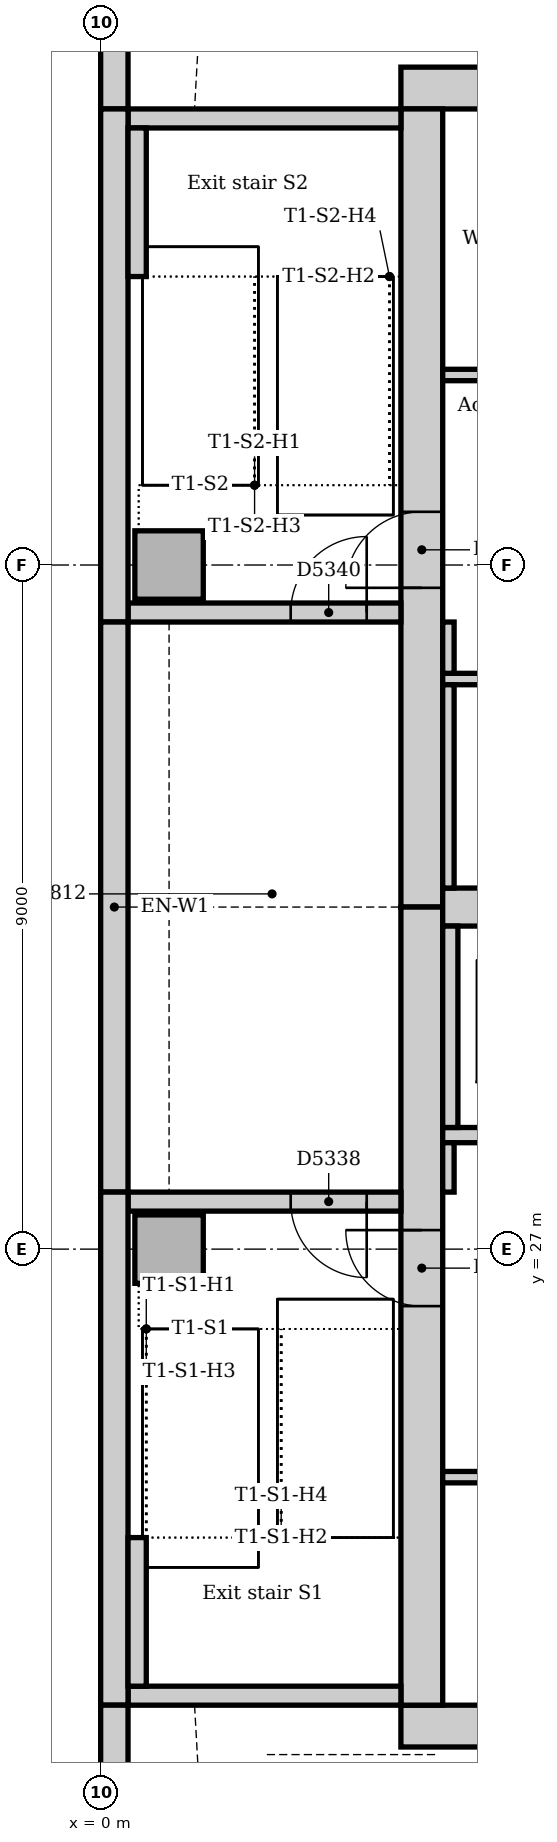
"""IFC4 building model, lengths in metres.
Left out: names, types, materials, properties, quantities, classifications, styles, units other than length and angle.
Written with IfcOpenShell. Run it as: python <this file> out.ifc"""

import sys

from ifc_helpers import new_model, si_unit, direction, frame, frame_2d, origin, origin_2d, place, context, subcontext, project, spatial, rectangle, extrude, element, fill, save


model = new_model("IFC4")
c1 = context("Model", 3, precision=1e-05, world=origin(), true_north=direction((0.0, 1.0)))
c2 = subcontext(c1, "Body", "Model", "MODEL_VIEW")
j1 = project(units=[si_unit("LENGTHUNIT", "METRE"), si_unit("PLANEANGLEUNIT", "RADIAN")], contexts=[c1])
p1 = place(None, origin())
s1 = spatial("IfcSite", under=j1, at=p1, CompositionType="ELEMENT")
p2 = place(p1, origin())
s2 = spatial("IfcBuilding", under=s1, at=p2, CompositionType="ELEMENT")
p3 = place(p2, frame((0.0, 0.0, 242.0)))
s3 = spatial("IfcBuildingStorey", under=s2, at=p3, CompositionType="ELEMENT", Elevation=242.0)
for number, where, z_axis, x_axis in (
    (1, (3.95, 20.725, 0.0), (0.0, 0.0, 1.0), (1.0, 0.0, 0.0)),
    (2, (23.05, 42.275, 0.0), (0.0, 0.0, 1.0), (-1.0, 0.0, 0.0)),
):
    element("IfcWall", number, at=place(p3, frame(where, z_axis=z_axis, x_axis=x_axis)), inside=s3, PredefinedType="SOLIDWALL", context=c2, shape_type="SweptSolid", body=[
        extrude(rectangle(XDim=19.1, YDim=0.55, at=frame_2d((9.55, 0.0))), origin(), (0.0, 0.0, 1.0), 5.0),
    ])
p4 = place(p3, frame((4.225, 42.0, 0.0), z_axis=(0.0, 0.0, 1.0), x_axis=(0.0, -1.0, 0.0)))
e3 = element("IfcWall", 3, at=p4, inside=s3, PredefinedType="SOLIDWALL", context=c2, shape_type="SweptSolid", body=[
    extrude(rectangle(XDim=10.5, YDim=0.55, at=frame_2d((5.25, 0.0))), origin(), (0.0, 0.0, 1.0), 5.0),
])
p5 = place(p4, frame((5.3, 0.0, 0.0)))
e4 = element("IfcOpeningElement", 4, at=p5, cuts=e3, PredefinedType="OPENING", context=c2, shape_type="SweptSolid", body=[
    extrude(rectangle(XDim=1.0, YDim=2.1, at=frame_2d((0.5, 1.05))), frame((0.0, 0.285, 0.0), z_axis=(0.0, -1.0, 0.0), x_axis=(1.0, 0.0, 0.0)), (0.0, 0.0, 1.0), 0.57),
])
p6 = place(p3, frame((4.225, 31.5, 0.0), z_axis=(0.0, 0.0, 1.0), x_axis=(0.0, -1.0, 0.0)))
e5 = element("IfcWall", 5, at=p6, inside=s3, PredefinedType="SOLIDWALL", context=c2, shape_type="SweptSolid", body=[
    extrude(rectangle(XDim=10.5, YDim=0.55, at=frame_2d((5.25, 0.0))), origin(), (0.0, 0.0, 1.0), 5.0),
])
p7 = place(p6, frame((4.25, 0.0, 0.0)))
e6 = element("IfcOpeningElement", 6, at=p7, cuts=e5, PredefinedType="OPENING", context=c2, shape_type="SweptSolid", body=[
    extrude(rectangle(XDim=1.0, YDim=2.1, at=frame_2d((0.5, 1.05))), frame((0.0, 0.285, 0.0), z_axis=(0.0, -1.0, 0.0), x_axis=(1.0, 0.0, 0.0)), (0.0, 0.0, 1.0), 0.57),
])
p8 = place(p3, frame((4.5, 31.5, 0.0), z_axis=(0.0, 0.0, 1.0), x_axis=(1.0, 0.0, 0.0)))
e7 = element("IfcWall", 7, at=p8, inside=s3, PredefinedType="SOLIDWALL", context=c2, shape_type="SweptSolid", body=[
    extrude(rectangle(XDim=18.0, YDim=0.5, at=frame_2d((9.0, 0.0))), origin(), (0.0, 0.0, 1.0), 5.0),
])
p9 = place(p3, frame((0.36, 21.125, 0.0), z_axis=(0.0, 0.0, 1.0), x_axis=(1.0, 0.0, 0.0)))
e8 = element("IfcWall", 8, at=p9, inside=s3, PredefinedType="SOLIDWALL", context=c2, shape_type="SweptSolid", body=[
    extrude(rectangle(XDim=3.59, YDim=0.25, at=frame_2d((1.795, 0.0))), origin(), (0.0, 0.0, 1.0), 5.0),
])
p10 = place(p3, frame((3.95, 27.625, 0.0), z_axis=(0.0, 0.0, 1.0), x_axis=(-1.0, 0.0, 0.0)))
e9 = element("IfcWall", 9, at=p10, inside=s3, PredefinedType="SOLIDWALL", context=c2, shape_type="SweptSolid", body=[
    extrude(rectangle(XDim=3.59, YDim=0.25, at=frame_2d((1.795, 0.0))), origin(), (0.0, 0.0, 1.0), 5.0),
])
p11 = place(p10, frame((0.45, 0.0, 0.0)))
e10 = element("IfcOpeningElement", 10, at=p11, cuts=e9, PredefinedType="OPENING", context=c2, shape_type="SweptSolid", body=[
    extrude(rectangle(XDim=1.0, YDim=2.1, at=frame_2d((0.5, 1.05))), frame((0.0, 0.135, 0.0), z_axis=(0.0, -1.0, 0.0), x_axis=(1.0, 0.0, 0.0)), (0.0, 0.0, 1.0), 0.27),
])
p12 = place(p3, frame((0.36, 35.375, 0.0), z_axis=(0.0, 0.0, 1.0), x_axis=(1.0, 0.0, 0.0)))
e11 = element("IfcWall", 11, at=p12, inside=s3, PredefinedType="SOLIDWALL", context=c2, shape_type="SweptSolid", body=[
    extrude(rectangle(XDim=3.59, YDim=0.25, at=frame_2d((1.795, 0.0))), origin(), (0.0, 0.0, 1.0), 5.0),
])
p13 = place(p12, frame((2.14, 0.0, 0.0)))
e12 = element("IfcOpeningElement", 12, at=p13, cuts=e11, PredefinedType="OPENING", context=c2, shape_type="SweptSolid", body=[
    extrude(rectangle(XDim=1.0, YDim=2.1, at=frame_2d((0.5, 1.05))), frame((0.0, 0.135, 0.0), z_axis=(0.0, -1.0, 0.0), x_axis=(1.0, 0.0, 0.0)), (0.0, 0.0, 1.0), 0.27),
])
p14 = place(p3, frame((3.95, 41.875, 0.0), z_axis=(0.0, 0.0, 1.0), x_axis=(-1.0, 0.0, 0.0)))
e13 = element("IfcWall", 13, at=p14, inside=s3, PredefinedType="SOLIDWALL", context=c2, shape_type="SweptSolid", body=[
    extrude(rectangle(XDim=3.59, YDim=0.25, at=frame_2d((1.795, 0.0))), origin(), (0.0, 0.0, 1.0), 5.0),
])
for number, where, z_axis, x_axis in (
    (14, (0.9, 27.0, 0.0), (0.0, 0.0, 1.0), (1.0, 0.0, 0.0)),
    (15, (0.9, 36.0, 0.0), (0.0, 0.0, 1.0), (1.0, 0.0, 0.0)),
):
    element("IfcColumn", number, at=place(p3, frame(where, z_axis=z_axis, x_axis=x_axis)), inside=s3, PredefinedType="COLUMN", context=c2, shape_type="SweptSolid", body=[
        extrude(rectangle(XDim=0.9, YDim=0.9, at=origin_2d()), origin(), (0.0, 0.0, 1.0), 5.0),
    ])
p15 = place(p3, frame((0.18, 54.257, 0.0), z_axis=(0.0, 0.0, 1.0), x_axis=(0.0, -1.0, 0.0)))
e16 = element("IfcWall", 16, at=p15, inside=s3, PredefinedType="STANDARD", context=c2, shape_type="SweptSolid", body=[
    extrude(rectangle(XDim=12.257, YDim=0.36, at=frame_2d((6.129, 0.0))), origin(), (0.0, 0.0, 1.0), 4.85),
])
p16 = place(p3, frame((0.18, 42.0, 0.0), z_axis=(0.0, 0.0, 1.0), x_axis=(0.0, -1.0, 0.0)))
e17 = element("IfcWall", 17, at=p16, inside=s3, PredefinedType="STANDARD", context=c2, shape_type="SweptSolid", body=[
    extrude(rectangle(XDim=6.75, YDim=0.36, at=frame_2d((3.375, 0.0))), origin(), (0.0, 0.0, 1.0), 4.85),
])
p17 = place(p3, frame((0.18, 35.25, 0.0), z_axis=(0.0, 0.0, 1.0), x_axis=(0.0, -1.0, 0.0)))
e18 = element("IfcWall", 18, at=p17, inside=s3, PredefinedType="STANDARD", context=c2, shape_type="SweptSolid", body=[
    extrude(rectangle(XDim=7.5, YDim=0.36, at=frame_2d((3.75, 0.0))), origin(), (0.0, 0.0, 1.0), 4.85),
])
p18 = place(p3, frame((0.18, 27.75, 0.0), z_axis=(0.0, 0.0, 1.0), x_axis=(0.0, -1.0, 0.0)))
e19 = element("IfcWall", 19, at=p18, inside=s3, PredefinedType="STANDARD", context=c2, shape_type="SweptSolid", body=[
    extrude(rectangle(XDim=6.75, YDim=0.36, at=frame_2d((3.375, 0.0))), origin(), (0.0, 0.0, 1.0), 4.85),
])
p19 = place(p3, frame((0.18, 21.0, 0.0), z_axis=(0.0, 0.0, 1.0), x_axis=(0.0, -1.0, 0.0)))
e20 = element("IfcWall", 20, at=p19, inside=s3, PredefinedType="STANDARD", context=c2, shape_type="SweptSolid", body=[
    extrude(rectangle(XDim=3.257, YDim=0.36, at=frame_2d((1.629, 0.0))), origin(), (0.0, 0.0, 1.0), 4.85),
])
for number, where, z_axis, x_axis in (
    (21, (0.48, 21.25, 0.0), (0.0, 0.0, 1.0), (0.0, 1.0, 0.0)),
    (22, (0.48, 39.795, 0.0), (0.0, 0.0, 1.0), (0.0, 1.0, 0.0)),
):
    element("IfcWall", number, at=place(p3, frame(where, z_axis=z_axis, x_axis=x_axis)), inside=s3, PredefinedType="STANDARD", context=c2, shape_type="SweptSolid", body=[
        extrude(rectangle(XDim=1.955, YDim=0.24, at=frame_2d((0.978, 0.0))), origin(), (0.0, 0.0, 1.0), 5.0),
    ])
p20 = place(p3, frame((4.5, 28.5, 0.0), z_axis=(0.0, 0.0, 1.0), x_axis=(1.0, 0.0, 0.0)))
e23 = element("IfcWall", 23, at=p20, inside=s3, PredefinedType="PARTITIONING", context=c2, shape_type="SweptSolid", body=[
    extrude(rectangle(XDim=18.0, YDim=0.2, at=frame_2d((9.0, 0.0))), origin(), (0.0, 0.0, 1.0), 4.85),
])
p21 = place(p20, frame((0.95, 0.0, 0.0)))
e24 = element("IfcOpeningElement", 24, at=p21, cuts=e23, PredefinedType="OPENING", context=c2, shape_type="SweptSolid", body=[
    extrude(rectangle(XDim=1.1, YDim=2.1, at=frame_2d((0.55, 1.05))), frame((0.0, 0.11, 0.0), z_axis=(0.0, -1.0, 0.0), x_axis=(1.0, 0.0, 0.0)), (0.0, 0.0, 1.0), 0.22),
])
p22 = place(p20, frame((3.95, 0.0, 0.0)))
e25 = element("IfcOpeningElement", 25, at=p22, cuts=e23, PredefinedType="OPENING", context=c2, shape_type="SweptSolid", body=[
    extrude(rectangle(XDim=1.1, YDim=2.1, at=frame_2d((0.55, 1.05))), frame((0.0, 0.11, 0.0), z_axis=(0.0, -1.0, 0.0), x_axis=(1.0, 0.0, 0.0)), (0.0, 0.0, 1.0), 0.22),
])
p23 = place(p20, frame((6.95, 0.0, 0.0)))
e26 = element("IfcOpeningElement", 26, at=p23, cuts=e23, PredefinedType="OPENING", context=c2, shape_type="SweptSolid", body=[
    extrude(rectangle(XDim=1.1, YDim=2.1, at=frame_2d((0.55, 1.05))), frame((0.0, 0.11, 0.0), z_axis=(0.0, -1.0, 0.0), x_axis=(1.0, 0.0, 0.0)), (0.0, 0.0, 1.0), 0.22),
])
p24 = place(p20, frame((9.95, 0.0, 0.0)))
e27 = element("IfcOpeningElement", 27, at=p24, cuts=e23, PredefinedType="OPENING", context=c2, shape_type="SweptSolid", body=[
    extrude(rectangle(XDim=1.1, YDim=2.1, at=frame_2d((0.55, 1.05))), frame((0.0, 0.11, 0.0), z_axis=(0.0, -1.0, 0.0), x_axis=(1.0, 0.0, 0.0)), (0.0, 0.0, 1.0), 0.22),
])
p25 = place(p20, frame((12.95, 0.0, 0.0)))
e28 = element("IfcOpeningElement", 28, at=p25, cuts=e23, PredefinedType="OPENING", context=c2, shape_type="SweptSolid", body=[
    extrude(rectangle(XDim=1.1, YDim=2.1, at=frame_2d((0.55, 1.05))), frame((0.0, 0.11, 0.0), z_axis=(0.0, -1.0, 0.0), x_axis=(1.0, 0.0, 0.0)), (0.0, 0.0, 1.0), 0.22),
])
p26 = place(p20, frame((15.95, 0.0, 0.0)))
e29 = element("IfcOpeningElement", 29, at=p26, cuts=e23, PredefinedType="OPENING", context=c2, shape_type="SweptSolid", body=[
    extrude(rectangle(XDim=1.1, YDim=2.1, at=frame_2d((0.55, 1.05))), frame((0.0, 0.11, 0.0), z_axis=(0.0, -1.0, 0.0), x_axis=(1.0, 0.0, 0.0)), (0.0, 0.0, 1.0), 0.22),
])
p27 = place(p3, frame((4.6, 28.6, 0.0), z_axis=(0.0, 0.0, 1.0), x_axis=(0.0, 1.0, 0.0)))
e30 = element("IfcWall", 30, at=p27, inside=s3, PredefinedType="PARTITIONING", context=c2, shape_type="SweptSolid", body=[
    extrude(rectangle(XDim=2.65, YDim=0.2, at=frame_2d((1.325, 0.0))), origin(), (0.0, 0.0, 1.0), 4.85),
])
p28 = place(p3, frame((4.5, 24.0, 0.0), z_axis=(0.0, 0.0, 1.0), x_axis=(1.0, 0.0, 0.0)))
e31 = element("IfcWall", 31, at=p28, inside=s3, PredefinedType="PARTITIONING", context=c2, shape_type="SweptSolid", body=[
    extrude(rectangle(XDim=18.0, YDim=0.15, at=frame_2d((9.0, 0.0))), origin(), (0.0, 0.0, 1.0), 4.85),
])
p29 = place(p28, frame((3.35, 0.0, 0.0)))
e32 = element("IfcOpeningElement", 32, at=p29, cuts=e31, PredefinedType="OPENING", context=c2, shape_type="SweptSolid", body=[
    extrude(rectangle(XDim=0.9, YDim=2.1, at=frame_2d((0.45, 1.05))), frame((0.0, 0.085, 0.0), z_axis=(0.0, -1.0, 0.0), x_axis=(1.0, 0.0, 0.0)), (0.0, 0.0, 1.0), 0.17),
])
p30 = place(p28, frame((8.55, 0.0, 0.0)))
e33 = element("IfcOpeningElement", 33, at=p30, cuts=e31, PredefinedType="OPENING", context=c2, shape_type="SweptSolid", body=[
    extrude(rectangle(XDim=0.9, YDim=2.1, at=frame_2d((0.45, 1.05))), frame((0.0, 0.085, 0.0), z_axis=(0.0, -1.0, 0.0), x_axis=(1.0, 0.0, 0.0)), (0.0, 0.0, 1.0), 0.17),
])
p31 = place(p28, frame((13.7, 0.0, 0.0)))
e34 = element("IfcOpeningElement", 34, at=p31, cuts=e31, PredefinedType="OPENING", context=c2, shape_type="SweptSolid", body=[
    extrude(rectangle(XDim=0.9, YDim=2.1, at=frame_2d((0.45, 1.05))), frame((0.0, 0.085, 0.0), z_axis=(0.0, -1.0, 0.0), x_axis=(1.0, 0.0, 0.0)), (0.0, 0.0, 1.0), 0.17),
])
p32 = place(p3, frame((4.5, 38.5, 0.0), z_axis=(0.0, 0.0, 1.0), x_axis=(1.0, 0.0, 0.0)))
e35 = element("IfcWall", 35, at=p32, inside=s3, PredefinedType="PARTITIONING", context=c2, shape_type="SweptSolid", body=[
    extrude(rectangle(XDim=11.9, YDim=0.15, at=frame_2d((5.95, 0.0))), origin(), (0.0, 0.0, 1.0), 4.85),
])
p33 = place(p32, frame((1.1, 0.0, 0.0)))
e36 = element("IfcOpeningElement", 36, at=p33, cuts=e35, PredefinedType="OPENING", context=c2, shape_type="SweptSolid", body=[
    extrude(rectangle(XDim=0.9, YDim=2.1, at=frame_2d((0.45, 1.05))), frame((0.0, 0.085, 0.0), z_axis=(0.0, -1.0, 0.0), x_axis=(1.0, 0.0, 0.0)), (0.0, 0.0, 1.0), 0.17),
])
p34 = place(p32, frame((4.05, 0.0, 0.0)))
e37 = element("IfcOpeningElement", 37, at=p34, cuts=e35, PredefinedType="OPENING", context=c2, shape_type="SweptSolid", body=[
    extrude(rectangle(XDim=0.9, YDim=2.1, at=frame_2d((0.45, 1.05))), frame((0.0, 0.085, 0.0), z_axis=(0.0, -1.0, 0.0), x_axis=(1.0, 0.0, 0.0)), (0.0, 0.0, 1.0), 0.17),
])
p35 = place(p32, frame((7.05, 0.0, 0.0)))
e38 = element("IfcOpeningElement", 38, at=p35, cuts=e35, PredefinedType="OPENING", context=c2, shape_type="SweptSolid", body=[
    extrude(rectangle(XDim=0.9, YDim=2.1, at=frame_2d((0.45, 1.05))), frame((0.0, 0.085, 0.0), z_axis=(0.0, -1.0, 0.0), x_axis=(1.0, 0.0, 0.0)), (0.0, 0.0, 1.0), 0.17),
])
p36 = place(p32, frame((9.95, 0.0, 0.0)))
e39 = element("IfcOpeningElement", 39, at=p36, cuts=e35, PredefinedType="OPENING", context=c2, shape_type="SweptSolid", body=[
    extrude(rectangle(XDim=0.8, YDim=2.1, at=frame_2d((0.4, 1.05))), frame((0.0, 0.085, 0.0), z_axis=(0.0, -1.0, 0.0), x_axis=(1.0, 0.0, 0.0)), (0.0, 0.0, 1.0), 0.17),
])
p37 = place(p3, frame((4.5, 34.5, 0.0), z_axis=(0.0, 0.0, 1.0), x_axis=(1.0, 0.0, 0.0)))
e40 = element("IfcWall", 40, at=p37, inside=s3, PredefinedType="PARTITIONING", context=c2, shape_type="SweptSolid", body=[
    extrude(rectangle(XDim=5.9, YDim=0.15, at=frame_2d((2.95, 0.0))), origin(), (0.0, 0.0, 1.0), 4.85),
])
p38 = place(p37, frame((2.5, 0.0, 0.0)))
e41 = element("IfcOpeningElement", 41, at=p38, cuts=e40, PredefinedType="OPENING", context=c2, shape_type="SweptSolid", body=[
    extrude(rectangle(XDim=0.9, YDim=2.1, at=frame_2d((0.45, 1.05))), frame((0.0, 0.085, 0.0), z_axis=(0.0, -1.0, 0.0), x_axis=(1.0, 0.0, 0.0)), (0.0, 0.0, 1.0), 0.17),
])
p39 = place(p3, frame((4.575, 34.575, 0.0), z_axis=(0.0, 0.0, 1.0), x_axis=(0.0, 1.0, 0.0)))
e42 = element("IfcWall", 42, at=p39, inside=s3, PredefinedType="PARTITIONING", context=c2, shape_type="SweptSolid", body=[
    extrude(rectangle(XDim=0.675, YDim=0.15, at=frame_2d((0.338, 0.0))), origin(), (0.0, 0.0, 1.0), 4.85),
])
p40 = place(p3, frame((4.575, 31.75, 0.0), z_axis=(0.0, 0.0, 1.0), x_axis=(0.0, 1.0, 0.0)))
e43 = element("IfcWall", 43, at=p40, inside=s3, PredefinedType="PARTITIONING", context=c2, shape_type="SweptSolid", body=[
    extrude(rectangle(XDim=2.675, YDim=0.15, at=frame_2d((1.337, 0.0))), origin(), (0.0, 0.0, 1.0), 4.85),
])
p41 = place(p3, frame((4.575, 27.75, 0.0), z_axis=(0.0, 0.0, 1.0), x_axis=(0.0, 1.0, 0.0)))
e44 = element("IfcWall", 44, at=p41, inside=s3, PredefinedType="PARTITIONING", context=c2, shape_type="SweptSolid", body=[
    extrude(rectangle(XDim=0.65, YDim=0.15, at=frame_2d((0.325, 0.0))), origin(), (0.0, 0.0, 1.0), 4.85),
])
p42 = place(p7, frame((1.0, 0.0, 0.0), z_axis=(0.0, 0.0, 1.0), x_axis=(-1.0, 0.0, 0.0)))
e45 = element("IfcDoor", 45, at=p42, inside=s3, OperationType="SINGLE_SWING_RIGHT", PredefinedType="DOOR", context=c2, shape_type="SweptSolid", body=[
    extrude(rectangle(XDim=1.0, YDim=2.1, at=frame_2d((0.5, 1.05))), frame((0.0, 0.025, 0.0), z_axis=(0.0, -1.0, 0.0), x_axis=(1.0, 0.0, 0.0)), (0.0, 0.0, 1.0), 0.05),
])
fill(e6, e45)
p43 = place(p11, origin())
e46 = element("IfcDoor", 46, at=p43, inside=s3, OperationType="SINGLE_SWING_LEFT", PredefinedType="DOOR", context=c2, shape_type="SweptSolid", body=[
    extrude(rectangle(XDim=1.0, YDim=2.1, at=frame_2d((0.5, 1.05))), frame((0.0, 0.025, 0.0), z_axis=(0.0, -1.0, 0.0), x_axis=(1.0, 0.0, 0.0)), (0.0, 0.0, 1.0), 0.05),
])
fill(e10, e46)
p44 = place(p5, frame((1.0, 0.0, 0.0), z_axis=(0.0, 0.0, 1.0), x_axis=(-1.0, 0.0, 0.0)))
e47 = element("IfcDoor", 47, at=p44, inside=s3, OperationType="SINGLE_SWING_LEFT", PredefinedType="DOOR", context=c2, shape_type="SweptSolid", body=[
    extrude(rectangle(XDim=1.0, YDim=2.1, at=frame_2d((0.5, 1.05))), frame((0.0, 0.025, 0.0), z_axis=(0.0, -1.0, 0.0), x_axis=(1.0, 0.0, 0.0)), (0.0, 0.0, 1.0), 0.05),
])
fill(e4, e47)
p45 = place(p13, origin())
e48 = element("IfcDoor", 48, at=p45, inside=s3, OperationType="SINGLE_SWING_RIGHT", PredefinedType="DOOR", context=c2, shape_type="SweptSolid", body=[
    extrude(rectangle(XDim=1.0, YDim=2.1, at=frame_2d((0.5, 1.05))), frame((0.0, 0.025, 0.0), z_axis=(0.0, -1.0, 0.0), x_axis=(1.0, 0.0, 0.0)), (0.0, 0.0, 1.0), 0.05),
])
fill(e12, e48)
save(model, sys.argv[1])
